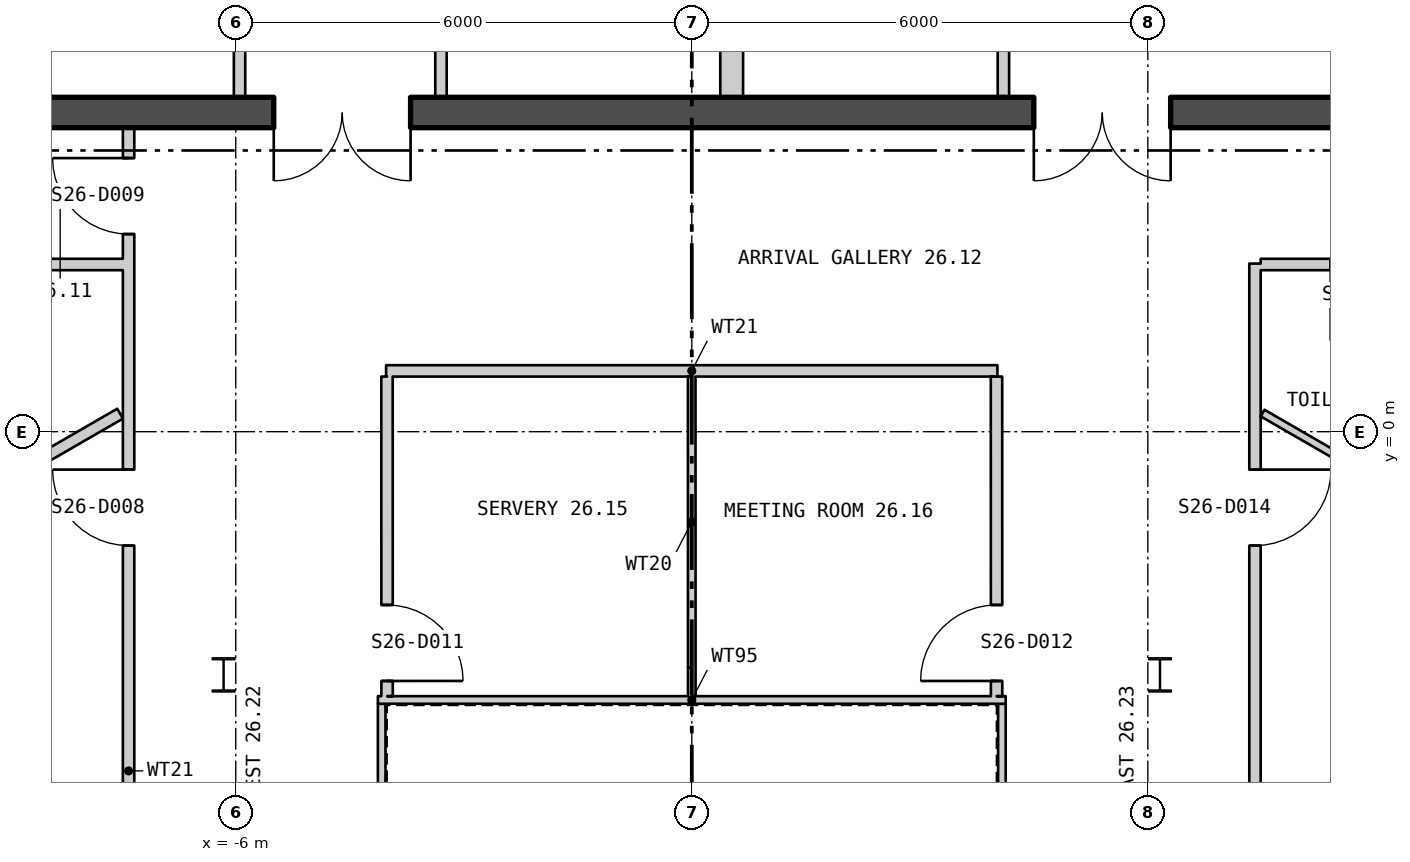
"""IFC4 building model, lengths in metres.
Left out: names, types, materials, properties, quantities, classifications, styles, units other than length and angle.
Written with IfcOpenShell. Run it as: python <this file> out.ifc"""

import sys

from ifc_helpers import new_model, si_unit, direction, frame, frame_2d, origin, origin_2d, place, context, subcontext, project, spatial, polyline, rectangle, i_section, outline, extrude, element, fill, save


model = new_model("IFC4")
c1 = context("Model", 3, precision=1e-05, world=origin(), true_north=direction((0.0, 1.0)))
c2 = subcontext(c1, "Body", "Model", "MODEL_VIEW")
j1 = project(units=[si_unit("LENGTHUNIT", "METRE"), si_unit("PLANEANGLEUNIT", "RADIAN")], contexts=[c1])
p1 = place(None, origin())
s1 = spatial("IfcSite", under=j1, at=p1, CompositionType="ELEMENT")
p2 = place(p1, origin())
s2 = spatial("IfcBuilding", under=s1, at=p2, CompositionType="ELEMENT")
p3 = place(p2, frame((0.0, 0.0, 329.4)))
s3 = spatial("IfcBuildingStorey", under=s2, at=p3, CompositionType="ELEMENT", Elevation=329.4)
for number, where, z_axis, x_axis in (
    (1, (6.16, -3.2, 0.0), (0.0, 0.0, 1.0), (1.0, 0.0, 0.0)),
    (2, (-6.16, -3.2, 0.0), (0.0, 0.0, 1.0), (1.0, 0.0, 0.0)),
):
    element("IfcColumn", number, at=place(p3, frame(where, z_axis=z_axis, x_axis=x_axis)), inside=s3, PredefinedType="COLUMN", context=c2, shape_type="SweptSolid", body=[
        extrude(i_section(OverallWidth=0.3, OverallDepth=0.45, WebThickness=0.014, FlangeThickness=0.026, at=origin_2d()), origin(), (0.0, 0.0, 1.0), 4.2),
    ])
p4 = place(p3, frame((-24.765, 16.684, -0.18), z_axis=(0.0, 0.0, 1.0), x_axis=(0.500000141277, -0.866025322218, 0.0)))
e3 = element("IfcWall", 3, at=p4, inside=s3, PredefinedType="SOLIDWALL", context=c2, shape_type="SweptSolid", body=[
    extrude(outline(polyline([(-0.13, -0.225), (45.86, -0.225), (45.6, 0.225), (0.13, 0.225), (-0.13, -0.225)])), origin(), (0.0, 0.0, 1.0), 3.98),
])
p5 = place(p4, frame((1.424, 0.0, 1.08)))
e4 = element("IfcOpeningElement", 4, at=p5, cuts=e3, PredefinedType="OPENING", context=c2, shape_type="SweptSolid", body=[
    extrude(rectangle(XDim=2.4, YDim=2.3, at=frame_2d((1.2, 1.15))), frame((0.0, 0.235, 0.0), z_axis=(0.0, -1.0, 0.0), x_axis=(1.0, 0.0, 0.0)), (0.0, 0.0, 1.0), 0.47),
])
p6 = place(p4, frame((5.892, 0.0, 1.08)))
e5 = element("IfcOpeningElement", 5, at=p6, cuts=e3, PredefinedType="OPENING", context=c2, shape_type="SweptSolid", body=[
    extrude(rectangle(XDim=2.4, YDim=2.3, at=frame_2d((1.2, 1.15))), frame((0.0, 0.235, 0.0), z_axis=(0.0, -1.0, 0.0), x_axis=(1.0, 0.0, 0.0)), (0.0, 0.0, 1.0), 0.47),
])
p7 = place(p4, frame((10.399, 0.0, 1.08)))
e6 = element("IfcOpeningElement", 6, at=p7, cuts=e3, PredefinedType="OPENING", context=c2, shape_type="SweptSolid", body=[
    extrude(rectangle(XDim=2.4, YDim=2.3, at=frame_2d((1.2, 1.15))), frame((0.0, 0.235, 0.0), z_axis=(0.0, -1.0, 0.0), x_axis=(1.0, 0.0, 0.0)), (0.0, 0.0, 1.0), 0.47),
])
p8 = place(p4, frame((19.412, 0.0, 1.08)))
e7 = element("IfcOpeningElement", 7, at=p8, cuts=e3, PredefinedType="OPENING", context=c2, shape_type="SweptSolid", body=[
    extrude(rectangle(XDim=2.4, YDim=2.3, at=frame_2d((1.2, 1.15))), frame((0.0, 0.235, 0.0), z_axis=(0.0, -1.0, 0.0), x_axis=(1.0, 0.0, 0.0)), (0.0, 0.0, 1.0), 0.47),
])
p9 = place(p4, frame((23.918, 0.0, 1.08)))
e8 = element("IfcOpeningElement", 8, at=p9, cuts=e3, PredefinedType="OPENING", context=c2, shape_type="SweptSolid", body=[
    extrude(rectangle(XDim=2.4, YDim=2.3, at=frame_2d((1.2, 1.15))), frame((0.0, 0.235, 0.0), z_axis=(0.0, -1.0, 0.0), x_axis=(1.0, 0.0, 0.0)), (0.0, 0.0, 1.0), 0.47),
])
p10 = place(p4, frame((28.425, 0.0, 1.08)))
e9 = element("IfcOpeningElement", 9, at=p10, cuts=e3, PredefinedType="OPENING", context=c2, shape_type="SweptSolid", body=[
    extrude(rectangle(XDim=2.4, YDim=2.3, at=frame_2d((1.2, 1.15))), frame((0.0, 0.235, 0.0), z_axis=(0.0, -1.0, 0.0), x_axis=(1.0, 0.0, 0.0)), (0.0, 0.0, 1.0), 0.47),
])
p11 = place(p4, frame((37.438, 0.0, 1.08)))
e10 = element("IfcOpeningElement", 10, at=p11, cuts=e3, PredefinedType="OPENING", context=c2, shape_type="SweptSolid", body=[
    extrude(rectangle(XDim=2.4, YDim=2.3, at=frame_2d((1.2, 1.15))), frame((0.0, 0.235, 0.0), z_axis=(0.0, -1.0, 0.0), x_axis=(1.0, 0.0, 0.0)), (0.0, 0.0, 1.0), 0.47),
])
p12 = place(p4, frame((41.907, 0.0, 1.08)))
e11 = element("IfcOpeningElement", 11, at=p12, cuts=e3, PredefinedType="OPENING", context=c2, shape_type="SweptSolid", body=[
    extrude(rectangle(XDim=2.4, YDim=2.3, at=frame_2d((1.2, 1.15))), frame((0.0, 0.235, 0.0), z_axis=(0.0, -1.0, 0.0), x_axis=(1.0, 0.0, 0.0)), (0.0, 0.0, 1.0), 0.47),
])
p13 = place(p3, frame((1.9, -22.92, -0.18), z_axis=(0.0, 0.0, 1.0), x_axis=(0.500000141277, 0.866025322218, 0.0)))
e12 = element("IfcWall", 12, at=p13, inside=s3, PredefinedType="SOLIDWALL", context=c2, shape_type="SweptSolid", body=[
    extrude(outline(polyline([(-0.13, -0.225), (45.86, -0.225), (45.6, 0.225), (0.13, 0.225), (-0.13, -0.225)])), origin(), (0.0, 0.0, 1.0), 3.98),
])
p14 = place(p13, frame((1.424, 0.0, 1.08)))
e13 = element("IfcOpeningElement", 13, at=p14, cuts=e12, PredefinedType="OPENING", context=c2, shape_type="SweptSolid", body=[
    extrude(rectangle(XDim=2.4, YDim=2.3, at=frame_2d((1.2, 1.15))), frame((0.0, 0.235, 0.0), z_axis=(0.0, -1.0, 0.0), x_axis=(1.0, 0.0, 0.0)), (0.0, 0.0, 1.0), 0.47),
])
p15 = place(p13, frame((5.892, 0.0, 1.08)))
e14 = element("IfcOpeningElement", 14, at=p15, cuts=e12, PredefinedType="OPENING", context=c2, shape_type="SweptSolid", body=[
    extrude(rectangle(XDim=2.4, YDim=2.3, at=frame_2d((1.2, 1.15))), frame((0.0, 0.235, 0.0), z_axis=(0.0, -1.0, 0.0), x_axis=(1.0, 0.0, 0.0)), (0.0, 0.0, 1.0), 0.47),
])
p16 = place(p13, frame((14.905, 0.0, 1.08)))
e15 = element("IfcOpeningElement", 15, at=p16, cuts=e12, PredefinedType="OPENING", context=c2, shape_type="SweptSolid", body=[
    extrude(rectangle(XDim=2.4, YDim=2.3, at=frame_2d((1.2, 1.15))), frame((0.0, 0.235, 0.0), z_axis=(0.0, -1.0, 0.0), x_axis=(1.0, 0.0, 0.0)), (0.0, 0.0, 1.0), 0.47),
])
p17 = place(p13, frame((19.412, 0.0, 1.08)))
e16 = element("IfcOpeningElement", 16, at=p17, cuts=e12, PredefinedType="OPENING", context=c2, shape_type="SweptSolid", body=[
    extrude(rectangle(XDim=2.4, YDim=2.3, at=frame_2d((1.2, 1.15))), frame((0.0, 0.235, 0.0), z_axis=(0.0, -1.0, 0.0), x_axis=(1.0, 0.0, 0.0)), (0.0, 0.0, 1.0), 0.47),
])
p18 = place(p13, frame((23.918, 0.0, 1.08)))
e17 = element("IfcOpeningElement", 17, at=p18, cuts=e12, PredefinedType="OPENING", context=c2, shape_type="SweptSolid", body=[
    extrude(rectangle(XDim=2.4, YDim=2.3, at=frame_2d((1.2, 1.15))), frame((0.0, 0.235, 0.0), z_axis=(0.0, -1.0, 0.0), x_axis=(1.0, 0.0, 0.0)), (0.0, 0.0, 1.0), 0.47),
])
p19 = place(p13, frame((32.932, 0.0, 1.08)))
e18 = element("IfcOpeningElement", 18, at=p19, cuts=e12, PredefinedType="OPENING", context=c2, shape_type="SweptSolid", body=[
    extrude(rectangle(XDim=2.4, YDim=2.3, at=frame_2d((1.2, 1.15))), frame((0.0, 0.235, 0.0), z_axis=(0.0, -1.0, 0.0), x_axis=(1.0, 0.0, 0.0)), (0.0, 0.0, 1.0), 0.47),
])
p20 = place(p13, frame((37.438, 0.0, 1.08)))
e19 = element("IfcOpeningElement", 19, at=p20, cuts=e12, PredefinedType="OPENING", context=c2, shape_type="SweptSolid", body=[
    extrude(rectangle(XDim=2.4, YDim=2.3, at=frame_2d((1.2, 1.15))), frame((0.0, 0.235, 0.0), z_axis=(0.0, -1.0, 0.0), x_axis=(1.0, 0.0, 0.0)), (0.0, 0.0, 1.0), 0.47),
])
p21 = place(p13, frame((41.907, 0.0, 1.08)))
e20 = element("IfcOpeningElement", 20, at=p21, cuts=e12, PredefinedType="OPENING", context=c2, shape_type="SweptSolid", body=[
    extrude(rectangle(XDim=2.4, YDim=2.3, at=frame_2d((1.2, 1.15))), frame((0.0, 0.235, 0.0), z_axis=(0.0, -1.0, 0.0), x_axis=(1.0, 0.0, 0.0)), (0.0, 0.0, 1.0), 0.47),
])
p22 = place(p3, frame((4.08, -11.62, 0.0), z_axis=(0.0, 0.0, 1.0), x_axis=(0.0, 1.0, 0.0)))
e21 = element("IfcWall", 21, at=p22, inside=s3, PredefinedType="PARTITIONING", context=c2, shape_type="SweptSolid", body=[
    extrude(rectangle(XDim=8.04, YDim=0.1, at=frame_2d((4.02, 0.0))), origin(), (0.0, 0.0, 1.0), 4.0),
])
p23 = place(p3, frame((4.13, -3.53, 0.0), z_axis=(0.0, 0.0, 1.0), x_axis=(-1.0, 0.0, 0.0)))
e22 = element("IfcWall", 22, at=p23, inside=s3, PredefinedType="PARTITIONING", context=c2, shape_type="SweptSolid", body=[
    extrude(rectangle(XDim=8.26, YDim=0.1, at=frame_2d((4.13, 0.0))), origin(), (0.0, 0.0, 1.0), 4.0),
])
p24 = place(p3, frame((-4.08, -3.58, 0.0), z_axis=(0.0, 0.0, 1.0), x_axis=(0.0, -1.0, 0.0)))
e23 = element("IfcWall", 23, at=p24, inside=s3, PredefinedType="PARTITIONING", context=c2, shape_type="SweptSolid", body=[
    extrude(rectangle(XDim=8.04, YDim=0.1, at=frame_2d((4.02, 0.0))), origin(), (0.0, 0.0, 1.0), 4.0),
])
p25 = place(p3, frame((-14.5, 4.2, 0.0), z_axis=(0.0, 0.0, 1.0), x_axis=(1.0, 0.0, 0.0)))
e24 = element("IfcWall", 24, at=p25, inside=s3, PredefinedType="SHEAR", context=c2, shape_type="SweptSolid", body=[
    extrude(rectangle(XDim=29.0, YDim=0.4, at=frame_2d((14.5, 0.0))), origin(), (0.0, 0.0, 1.0), 4.0),
])
p26 = place(p25, frame((9.0, 0.0, 0.0)))
e25 = element("IfcOpeningElement", 25, at=p26, cuts=e24, PredefinedType="OPENING", context=c2, shape_type="SweptSolid", body=[
    extrude(rectangle(XDim=1.8, YDim=2.4, at=frame_2d((0.9, 1.2))), frame((0.0, 0.21, 0.0), z_axis=(0.0, -1.0, 0.0), x_axis=(1.0, 0.0, 0.0)), (0.0, 0.0, 1.0), 0.42),
])
p27 = place(p25, frame((19.0, 0.0, 0.0)))
e26 = element("IfcOpeningElement", 26, at=p27, cuts=e24, PredefinedType="OPENING", context=c2, shape_type="SweptSolid", body=[
    extrude(rectangle(XDim=1.8, YDim=2.4, at=frame_2d((0.9, 1.2))), frame((0.0, 0.21, 0.0), z_axis=(0.0, -1.0, 0.0), x_axis=(1.0, 0.0, 0.0)), (0.0, 0.0, 1.0), 0.42),
])
for number, where, z_axis, x_axis in (
    (27, (-5.95, 4.4, 0.0), (0.0, 0.0, 1.0), (0.0, 1.0, 0.0)),
    (28, (-3.3, 4.4, 0.0), (0.0, 0.0, 1.0), (0.0, 1.0, 0.0)),
    (29, (0.45, 4.4, 0.0), (0.0, 0.0, 1.0), (0.0, 1.0, 0.0)),
    (30, (0.6, 4.4, 0.0), (0.0, 0.0, 1.0), (0.0, 1.0, 0.0)),
    (31, (4.1, 4.4, 0.0), (0.0, 0.0, 1.0), (0.0, 1.0, 0.0)),
):
    element("IfcWall", number, at=place(p3, frame(where, z_axis=z_axis, x_axis=x_axis)), inside=s3, PredefinedType="PARTITIONING", context=c2, shape_type="SweptSolid", body=[
        extrude(rectangle(XDim=1.895, YDim=0.15, at=frame_2d((0.948, 0.0))), origin(), (0.0, 0.0, 1.0), 4.0),
    ])
p28 = place(p3, frame((-16.143, 2.2, 0.0), z_axis=(0.0, 0.0, 1.0), x_axis=(1.0, 0.0, 0.0)))
e32 = element("IfcWall", 32, at=p28, inside=s3, PredefinedType="PARTITIONING", context=c2, shape_type="SweptSolid", body=[
    extrude(rectangle(XDim=8.658, YDim=0.15, at=frame_2d((4.329, 0.0))), origin(), (0.0, 0.0, 1.0), 4.0),
])
p29 = place(p28, frame((3.738, 0.0, 0.0)))
e33 = element("IfcOpeningElement", 33, at=p29, cuts=e32, PredefinedType="OPENING", context=c2, shape_type="SweptSolid", body=[
    extrude(rectangle(XDim=1.0, YDim=2.1, at=frame_2d((0.5, 1.05))), frame((0.0, 0.085, 0.0), z_axis=(0.0, -1.0, 0.0), x_axis=(1.0, 0.0, 0.0)), (0.0, 0.0, 1.0), 0.17),
])
p30 = place(p3, frame((-12.748, -2.78, 0.0), z_axis=(0.0, 0.0, 1.0), x_axis=(0.86604208752, 0.499971101808, 0.0)))
e34 = element("IfcWall", 34, at=p30, inside=s3, PredefinedType="PARTITIONING", context=c2, shape_type="SweptSolid", body=[
    extrude(rectangle(XDim=6.034, YDim=0.15, at=frame_2d((3.017, 0.0))), origin(), (0.0, 0.0, 1.0), 4.0),
])
p31 = place(p3, frame((-7.41, -12.926, 0.0), z_axis=(0.0, 0.0, 1.0), x_axis=(0.0, 1.0, 0.0)))
e35 = element("IfcWall", 35, at=p31, inside=s3, PredefinedType="PARTITIONING", context=c2, shape_type="SweptSolid", body=[
    extrude(rectangle(XDim=16.926, YDim=0.15, at=frame_2d((8.463, 0.0))), origin(), (0.0, 0.0, 1.0), 4.0),
])
p32 = place(p31, frame((3.512, 0.0, 0.0)))
e36 = element("IfcOpeningElement", 36, at=p32, cuts=e35, PredefinedType="OPENING", context=c2, shape_type="SweptSolid", body=[
    extrude(rectangle(XDim=1.0, YDim=2.1, at=frame_2d((0.5, 1.05))), frame((0.0, 0.085, 0.0), z_axis=(0.0, -1.0, 0.0), x_axis=(1.0, 0.0, 0.0)), (0.0, 0.0, 1.0), 0.17),
])
p33 = place(p31, frame((11.427, 0.0, 0.0)))
e37 = element("IfcOpeningElement", 37, at=p33, cuts=e35, PredefinedType="OPENING", context=c2, shape_type="SweptSolid", body=[
    extrude(rectangle(XDim=1.0, YDim=2.1, at=frame_2d((0.5, 1.05))), frame((0.0, 0.085, 0.0), z_axis=(0.0, -1.0, 0.0), x_axis=(1.0, 0.0, 0.0)), (0.0, 0.0, 1.0), 0.17),
])
p34 = place(p31, frame((15.526, 0.0, 0.0)))
e38 = element("IfcOpeningElement", 38, at=p34, cuts=e35, PredefinedType="OPENING", context=c2, shape_type="SweptSolid", body=[
    extrude(rectangle(XDim=1.0, YDim=2.1, at=frame_2d((0.5, 1.05))), frame((0.0, 0.085, 0.0), z_axis=(0.0, -1.0, 0.0), x_axis=(1.0, 0.0, 0.0)), (0.0, 0.0, 1.0), 0.17),
])
p35 = place(p3, frame((-4.022, 0.8, 0.0), z_axis=(0.0, 0.0, 1.0), x_axis=(1.0, 0.0, 0.0)))
e39 = element("IfcWall", 39, at=p35, inside=s3, PredefinedType="PARTITIONING", context=c2, shape_type="SweptSolid", body=[
    extrude(rectangle(XDim=8.043, YDim=0.15, at=frame_2d((4.021, 0.0))), origin(), (0.0, 0.0, 1.0), 4.0),
])
p36 = place(p3, frame((-4.01, 0.725, 0.0), z_axis=(0.0, 0.0, 1.0), x_axis=(0.000237812122, -0.999999971723, 0.0)))
e40 = element("IfcWall", 40, at=p36, inside=s3, PredefinedType="PARTITIONING", context=c2, shape_type="SweptSolid", body=[
    extrude(rectangle(XDim=4.205, YDim=0.15, at=frame_2d((2.103, 0.0))), origin(), (0.0, 0.0, 1.0), 4.0),
])
p37 = place(p36, frame((3.005, 0.0, 0.0)))
e41 = element("IfcOpeningElement", 41, at=p37, cuts=e40, PredefinedType="OPENING", context=c2, shape_type="SweptSolid", body=[
    extrude(rectangle(XDim=1.0, YDim=2.1, at=frame_2d((0.5, 1.05))), frame((0.0, 0.085, 0.0), z_axis=(0.0, -1.0, 0.0), x_axis=(1.0, 0.0, 0.0)), (0.0, 0.0, 1.0), 0.17),
])
p38 = place(p3, frame((-0.001, 0.725, 0.0), z_axis=(0.0, 0.0, 1.0), x_axis=(0.000235294111, -0.999999972318, 0.0)))
e42 = element("IfcWall", 42, at=p38, inside=s3, PredefinedType="PARTITIONING", context=c2, shape_type="SweptSolid", body=[
    extrude(rectangle(XDim=3.825, YDim=0.1, at=frame_2d((1.913, 0.0))), origin(), (0.0, 0.0, 1.0), 3.55),
])
p39 = place(p3, frame((-0.0, -3.1, 0.0), z_axis=(0.0, 0.0, 1.0), x_axis=(0.000263157886, -0.999999965374, 0.0)))
e43 = element("IfcWall", 43, at=p39, inside=s3, PredefinedType="PARTITIONING", context=c2, shape_type="SweptSolid", body=[
    extrude(rectangle(XDim=0.38, YDim=0.1, at=frame_2d((0.19, 0.0))), origin(), (0.0, 0.0, 1.0), 4.0),
])
p40 = place(p3, frame((4.009, 0.725, 0.0), z_axis=(0.0, 0.0, 1.0), x_axis=(0.000237812122, -0.999999971723, 0.0)))
e44 = element("IfcWall", 44, at=p40, inside=s3, PredefinedType="PARTITIONING", context=c2, shape_type="SweptSolid", body=[
    extrude(rectangle(XDim=4.205, YDim=0.15, at=frame_2d((2.103, 0.0))), origin(), (0.0, 0.0, 1.0), 4.0),
])
p41 = place(p40, frame((3.005, 0.0, 0.0)))
e45 = element("IfcOpeningElement", 45, at=p41, cuts=e44, PredefinedType="OPENING", context=c2, shape_type="SweptSolid", body=[
    extrude(rectangle(XDim=1.0, YDim=2.1, at=frame_2d((0.5, 1.05))), frame((0.0, 0.085, 0.0), z_axis=(0.0, -1.0, 0.0), x_axis=(1.0, 0.0, 0.0)), (0.0, 0.0, 1.0), 0.17),
])
p42 = place(p3, frame((7.41, -12.926, 0.0), z_axis=(0.0, 0.0, 1.0), x_axis=(0.0, 1.0, 0.0)))
e46 = element("IfcWall", 46, at=p42, inside=s3, PredefinedType="PARTITIONING", context=c2, shape_type="SweptSolid", body=[
    extrude(rectangle(XDim=15.138, YDim=0.15, at=frame_2d((7.569, 0.0))), origin(), (0.0, 0.0, 1.0), 4.0),
])
p43 = place(p42, frame((3.512, 0.0, 0.0)))
e47 = element("IfcOpeningElement", 47, at=p43, cuts=e46, PredefinedType="OPENING", context=c2, shape_type="SweptSolid", body=[
    extrude(rectangle(XDim=1.0, YDim=2.1, at=frame_2d((0.5, 1.05))), frame((0.0, 0.085, 0.0), z_axis=(0.0, -1.0, 0.0), x_axis=(1.0, 0.0, 0.0)), (0.0, 0.0, 1.0), 0.17),
])
p44 = place(p42, frame((11.427, 0.0, 0.0)))
e48 = element("IfcOpeningElement", 48, at=p44, cuts=e46, PredefinedType="OPENING", context=c2, shape_type="SweptSolid", body=[
    extrude(rectangle(XDim=1.0, YDim=2.1, at=frame_2d((0.5, 1.05))), frame((0.0, 0.085, 0.0), z_axis=(0.0, -1.0, 0.0), x_axis=(1.0, 0.0, 0.0)), (0.0, 0.0, 1.0), 0.17),
])
p45 = place(p3, frame((7.485, 2.2, 0.0), z_axis=(0.0, 0.0, 1.0), x_axis=(1.0, 0.0, 0.0)))
e49 = element("IfcWall", 49, at=p45, inside=s3, PredefinedType="PARTITIONING", context=c2, shape_type="SweptSolid", body=[
    extrude(rectangle(XDim=8.658, YDim=0.15, at=frame_2d((4.329, 0.0))), origin(), (0.0, 0.0, 1.0), 4.0),
])
p46 = place(p45, frame((0.921, 0.0, 0.0)))
e50 = element("IfcOpeningElement", 50, at=p46, cuts=e49, PredefinedType="OPENING", context=c2, shape_type="SweptSolid", body=[
    extrude(rectangle(XDim=1.0, YDim=2.1, at=frame_2d((0.5, 1.05))), frame((0.0, 0.085, 0.0), z_axis=(0.0, -1.0, 0.0), x_axis=(1.0, 0.0, 0.0)), (0.0, 0.0, 1.0), 0.17),
])
p47 = place(p45, frame((3.581, 0.0, 0.0)))
e51 = element("IfcOpeningElement", 51, at=p47, cuts=e49, PredefinedType="OPENING", context=c2, shape_type="SweptSolid", body=[
    extrude(rectangle(XDim=1.0, YDim=2.1, at=frame_2d((0.5, 1.05))), frame((0.0, 0.085, 0.0), z_axis=(0.0, -1.0, 0.0), x_axis=(1.0, 0.0, 0.0)), (0.0, 0.0, 1.0), 0.17),
])
p48 = place(p45, frame((5.628, 0.0, 0.0)))
e52 = element("IfcOpeningElement", 52, at=p48, cuts=e49, PredefinedType="OPENING", context=c2, shape_type="SweptSolid", body=[
    extrude(rectangle(XDim=1.0, YDim=2.1, at=frame_2d((0.5, 1.05))), frame((0.0, 0.085, 0.0), z_axis=(0.0, -1.0, 0.0), x_axis=(1.0, 0.0, 0.0)), (0.0, 0.0, 1.0), 0.17),
])
p49 = place(p3, frame((7.51, 0.245, 0.0), z_axis=(0.0, 0.0, 1.0), x_axis=(0.865900672614, -0.50021597852, 0.0)))
e53 = element("IfcWall", 53, at=p49, inside=s3, PredefinedType="PARTITIONING", context=c2, shape_type="SweptSolid", body=[
    extrude(rectangle(XDim=4.326, YDim=0.1, at=frame_2d((2.163, 0.0))), origin(), (0.0, 0.0, 1.0), 4.0),
])
p50 = place(p26, origin())
e54 = element("IfcDoor", 54, at=p50, inside=s3, OperationType="DOUBLE_DOOR_SINGLE_SWING", PredefinedType="DOOR", context=c2, shape_type="SweptSolid", body=[
    extrude(rectangle(XDim=1.8, YDim=2.4, at=frame_2d((0.9, 1.2))), frame((0.0, 0.025, 0.0), z_axis=(0.0, -1.0, 0.0), x_axis=(1.0, 0.0, 0.0)), (0.0, 0.0, 1.0), 0.05),
])
fill(e25, e54)
p51 = place(p27, origin())
e55 = element("IfcDoor", 55, at=p51, inside=s3, OperationType="DOUBLE_DOOR_SINGLE_SWING", PredefinedType="DOOR", context=c2, shape_type="SweptSolid", body=[
    extrude(rectangle(XDim=1.8, YDim=2.4, at=frame_2d((0.9, 1.2))), frame((0.0, 0.025, 0.0), z_axis=(0.0, -1.0, 0.0), x_axis=(1.0, 0.0, 0.0)), (0.0, 0.0, 1.0), 0.05),
])
fill(e26, e55)
p52 = place(p33, origin())
e56 = element("IfcDoor", 56, at=p52, inside=s3, OperationType="SINGLE_SWING_LEFT", PredefinedType="DOOR", context=c2, shape_type="SweptSolid", body=[
    extrude(rectangle(XDim=1.0, YDim=2.1, at=frame_2d((0.5, 1.05))), frame((0.0, 0.025, 0.0), z_axis=(0.0, -1.0, 0.0), x_axis=(1.0, 0.0, 0.0)), (0.0, 0.0, 1.0), 0.05),
])
fill(e37, e56)
p53 = place(p34, origin())
e57 = element("IfcDoor", 57, at=p53, inside=s3, OperationType="SINGLE_SWING_LEFT", PredefinedType="DOOR", context=c2, shape_type="SweptSolid", body=[
    extrude(rectangle(XDim=1.0, YDim=2.1, at=frame_2d((0.5, 1.05))), frame((0.0, 0.025, 0.0), z_axis=(0.0, -1.0, 0.0), x_axis=(1.0, 0.0, 0.0)), (0.0, 0.0, 1.0), 0.05),
])
fill(e38, e57)
p54 = place(p37, origin())
e58 = element("IfcDoor", 58, at=p54, inside=s3, OperationType="SINGLE_SWING_LEFT", PredefinedType="DOOR", context=c2, shape_type="SweptSolid", body=[
    extrude(rectangle(XDim=1.0, YDim=2.1, at=frame_2d((0.5, 1.05))), frame((0.0, 0.025, 0.0), z_axis=(0.0, -1.0, 0.0), x_axis=(1.0, 0.0, 0.0)), (0.0, 0.0, 1.0), 0.05),
])
fill(e41, e58)
p55 = place(p41, origin())
e59 = element("IfcDoor", 59, at=p55, inside=s3, OperationType="SINGLE_SWING_RIGHT", PredefinedType="DOOR", context=c2, shape_type="SweptSolid", body=[
    extrude(rectangle(XDim=1.0, YDim=2.1, at=frame_2d((0.5, 1.05))), frame((0.0, 0.025, 0.0), z_axis=(0.0, -1.0, 0.0), x_axis=(1.0, 0.0, 0.0)), (0.0, 0.0, 1.0), 0.05),
])
fill(e45, e59)
p56 = place(p44, origin())
e60 = element("IfcDoor", 60, at=p56, inside=s3, OperationType="SINGLE_SWING_RIGHT", PredefinedType="DOOR", context=c2, shape_type="SweptSolid", body=[
    extrude(rectangle(XDim=1.0, YDim=2.1, at=frame_2d((0.5, 1.05))), frame((0.0, 0.025, 0.0), z_axis=(0.0, -1.0, 0.0), x_axis=(1.0, 0.0, 0.0)), (0.0, 0.0, 1.0), 0.05),
])
fill(e48, e60)
p57 = place(p46, origin())
e61 = element("IfcDoor", 61, at=p57, inside=s3, OperationType="SINGLE_SWING_LEFT", PredefinedType="DOOR", context=c2, shape_type="SweptSolid", body=[
    extrude(rectangle(XDim=1.0, YDim=2.1, at=frame_2d((0.5, 1.05))), frame((0.0, 0.025, 0.0), z_axis=(0.0, -1.0, 0.0), x_axis=(1.0, 0.0, 0.0)), (0.0, 0.0, 1.0), 0.05),
])
fill(e50, e61)
save(model, sys.argv[1])
